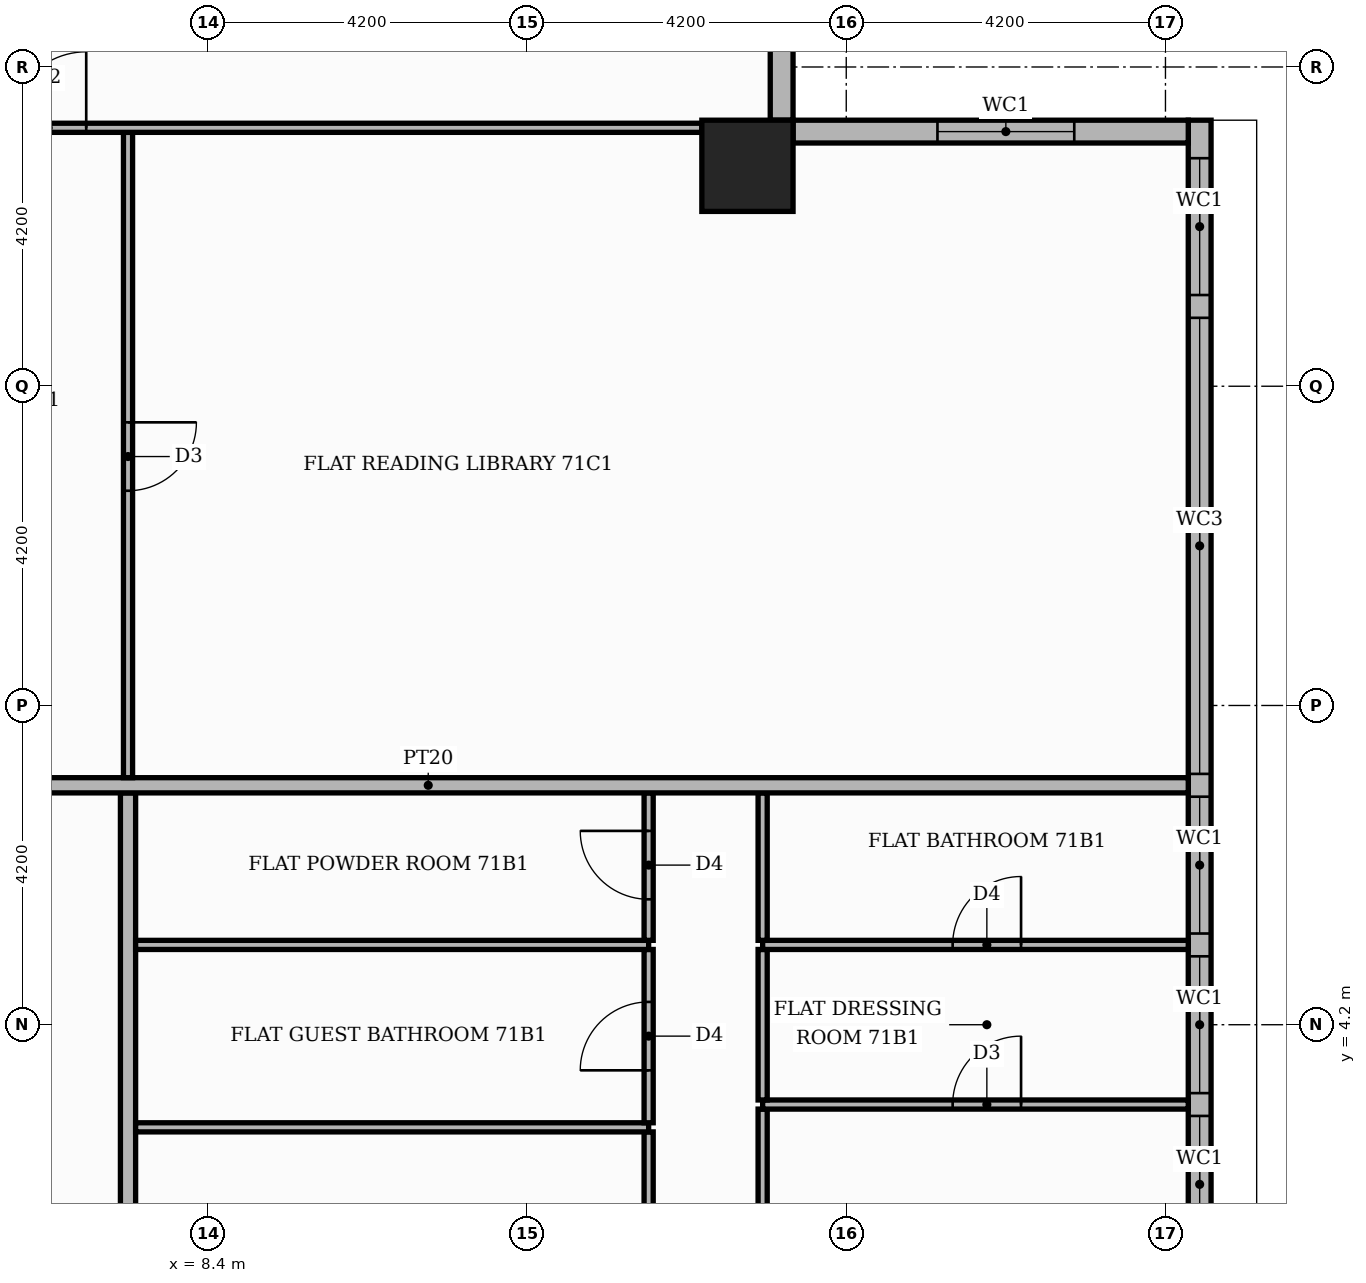
"""IFC4 building model, lengths in metres.
Left out: names, types, materials, properties, quantities, classifications, styles, units other than length and angle.
Written with IfcOpenShell. Run it as: python <this file> out.ifc"""

import sys

from ifc_helpers import new_model, si_unit, direction, frame, frame_2d, origin, origin_2d, place, context, subcontext, project, spatial, rectangle, extrude, element, fill, save


model = new_model("IFC4")
c1 = context("Model", 3, precision=1e-05, world=origin(), true_north=direction((0.0, 1.0)))
c2 = subcontext(c1, "Body", "Model", "MODEL_VIEW")
j1 = project(units=[si_unit("LENGTHUNIT", "METRE"), si_unit("PLANEANGLEUNIT", "RADIAN")], contexts=[c1])
p1 = place(None, origin())
s1 = spatial("IfcSite", under=j1, at=p1, CompositionType="ELEMENT")
p2 = place(p1, origin())
s2 = spatial("IfcBuilding", under=s1, at=p2, CompositionType="ELEMENT")
p3 = place(p2, frame((0.0, 0.0, 296.7)))
s3 = spatial("IfcBuildingStorey", under=s2, at=p3, CompositionType="ELEMENT", Elevation=296.7)
p4 = place(p3, frame((15.5, 15.5, 0.0), z_axis=(0.0, 0.0, 1.0), x_axis=(1.0, 0.0, 0.0)))
e1 = element("IfcColumn", 1, at=p4, inside=s3, PredefinedType="COLUMN", context=c2, shape_type="SweptSolid", body=[
    extrude(rectangle(XDim=1.2, YDim=1.2, at=origin_2d()), origin(), (0.0, 0.0, 1.0), 3.9),
])
p5 = place(p3, frame((21.45, -15.8, 0.0), z_axis=(0.0, 0.0, 1.0), x_axis=(0.0, 1.0, 0.0)))
e2 = element("IfcWall", 2, at=p5, inside=s3, PredefinedType="STANDARD", context=c2, shape_type="SweptSolid", body=[
    extrude(rectangle(XDim=31.9, YDim=0.3, at=frame_2d((15.95, 0.0))), origin(), (0.0, 0.0, 1.0), 3.55),
])
p6 = place(p5, frame((0.2, 0.0, 0.6)))
e3 = element("IfcOpeningElement", 3, at=p6, cuts=e2, PredefinedType="OPENING", context=c2, shape_type="SweptSolid", body=[
    extrude(rectangle(XDim=6.0, YDim=2.4, at=frame_2d((3.0, 1.2))), frame((0.0, 0.16, 0.0), z_axis=(0.0, -1.0, 0.0), x_axis=(1.0, 0.0, 0.0)), (0.0, 0.0, 1.0), 0.32),
])
p7 = place(p5, frame((6.5, 0.0, 0.6)))
e4 = element("IfcOpeningElement", 4, at=p7, cuts=e2, PredefinedType="OPENING", context=c2, shape_type="SweptSolid", body=[
    extrude(rectangle(XDim=3.9, YDim=2.4, at=frame_2d((1.95, 1.2))), frame((0.0, 0.16, 0.0), z_axis=(0.0, -1.0, 0.0), x_axis=(1.0, 0.0, 0.0)), (0.0, 0.0, 1.0), 0.32),
])
p8 = place(p5, frame((10.7, 0.0, 0.6)))
e5 = element("IfcOpeningElement", 5, at=p8, cuts=e2, PredefinedType="OPENING", context=c2, shape_type="SweptSolid", body=[
    extrude(rectangle(XDim=6.0, YDim=2.4, at=frame_2d((3.0, 1.2))), frame((0.0, 0.16, 0.0), z_axis=(0.0, -1.0, 0.0), x_axis=(1.0, 0.0, 0.0)), (0.0, 0.0, 1.0), 0.32),
])
p9 = place(p5, frame((17.0, 0.0, 0.6)))
e6 = element("IfcOpeningElement", 6, at=p9, cuts=e2, PredefinedType="OPENING", context=c2, shape_type="SweptSolid", body=[
    extrude(rectangle(XDim=1.8, YDim=2.4, at=frame_2d((0.9, 1.2))), frame((0.0, 0.16, 0.0), z_axis=(0.0, -1.0, 0.0), x_axis=(1.0, 0.0, 0.0)), (0.0, 0.0, 1.0), 0.32),
])
p10 = place(p5, frame((19.1, 0.0, 0.6)))
e7 = element("IfcOpeningElement", 7, at=p10, cuts=e2, PredefinedType="OPENING", context=c2, shape_type="SweptSolid", body=[
    extrude(rectangle(XDim=1.8, YDim=2.4, at=frame_2d((0.9, 1.2))), frame((0.0, 0.16, 0.0), z_axis=(0.0, -1.0, 0.0), x_axis=(1.0, 0.0, 0.0)), (0.0, 0.0, 1.0), 0.32),
])
p11 = place(p5, frame((21.2, 0.0, 0.6)))
e8 = element("IfcOpeningElement", 8, at=p11, cuts=e2, PredefinedType="OPENING", context=c2, shape_type="SweptSolid", body=[
    extrude(rectangle(XDim=1.8, YDim=2.4, at=frame_2d((0.9, 1.2))), frame((0.0, 0.16, 0.0), z_axis=(0.0, -1.0, 0.0), x_axis=(1.0, 0.0, 0.0)), (0.0, 0.0, 1.0), 0.32),
])
p12 = place(p5, frame((23.3, 0.0, 0.6)))
e9 = element("IfcOpeningElement", 9, at=p12, cuts=e2, PredefinedType="OPENING", context=c2, shape_type="SweptSolid", body=[
    extrude(rectangle(XDim=6.0, YDim=2.4, at=frame_2d((3.0, 1.2))), frame((0.0, 0.16, 0.0), z_axis=(0.0, -1.0, 0.0), x_axis=(1.0, 0.0, 0.0)), (0.0, 0.0, 1.0), 0.32),
])
p13 = place(p5, frame((29.6, 0.0, 0.6)))
e10 = element("IfcOpeningElement", 10, at=p13, cuts=e2, PredefinedType="OPENING", context=c2, shape_type="SweptSolid", body=[
    extrude(rectangle(XDim=1.8, YDim=2.4, at=frame_2d((0.9, 1.2))), frame((0.0, 0.16, 0.0), z_axis=(0.0, -1.0, 0.0), x_axis=(1.0, 0.0, 0.0)), (0.0, 0.0, 1.0), 0.32),
])
p14 = place(p3, frame((21.3, 15.95, 0.0), z_axis=(0.0, 0.0, 1.0), x_axis=(-1.0, 0.0, 0.0)))
e11 = element("IfcWall", 11, at=p14, inside=s3, PredefinedType="STANDARD", context=c2, shape_type="SweptSolid", body=[
    extrude(rectangle(XDim=5.2, YDim=0.3, at=frame_2d((2.6, 0.0))), origin(), (0.0, 0.0, 1.0), 3.55),
])
p15 = place(p14, frame((1.5, 0.0, 0.6)))
e12 = element("IfcOpeningElement", 12, at=p15, cuts=e11, PredefinedType="OPENING", context=c2, shape_type="SweptSolid", body=[
    extrude(rectangle(XDim=1.8, YDim=2.4, at=frame_2d((0.9, 1.2))), frame((0.0, 0.16, 0.0), z_axis=(0.0, -1.0, 0.0), x_axis=(1.0, 0.0, 0.0)), (0.0, 0.0, 1.0), 0.32),
])
p16 = place(p3, frame((15.95, 16.1, 0.0), z_axis=(0.0, 0.0, 1.0), x_axis=(0.0, 1.0, 0.0)))
e13 = element("IfcWall", 13, at=p16, inside=s3, PredefinedType="STANDARD", context=c2, shape_type="SweptSolid", body=[
    extrude(rectangle(XDim=5.5, YDim=0.3, at=frame_2d((2.75, 0.0))), origin(), (0.0, 0.0, 1.0), 3.55),
])
p17 = place(p16, frame((1.9, 0.0, 0.6)))
e14 = element("IfcOpeningElement", 14, at=p17, cuts=e13, PredefinedType="OPENING", context=c2, shape_type="SweptSolid", body=[
    extrude(rectangle(XDim=1.8, YDim=2.4, at=frame_2d((0.9, 1.2))), frame((0.0, 0.16, 0.0), z_axis=(0.0, -1.0, 0.0), x_axis=(1.0, 0.0, 0.0)), (0.0, 0.0, 1.0), 0.32),
])
p18 = place(p3, frame((7.35, -7.25, 0.0), z_axis=(0.0, 0.0, 1.0), x_axis=(0.0, 1.0, 0.0)))
e15 = element("IfcWall", 15, at=p18, inside=s3, PredefinedType="PARTITIONING", context=c2, shape_type="SweptSolid", body=[
    extrude(rectangle(XDim=14.5, YDim=0.2, at=frame_2d((7.25, 0.0))), origin(), (0.0, 0.0, 1.0), 3.55),
])
p19 = place(p18, frame((2.5, 0.0, 0.0)))
e16 = element("IfcOpeningElement", 16, at=p19, cuts=e15, PredefinedType="OPENING", context=c2, shape_type="SweptSolid", body=[
    extrude(rectangle(XDim=1.1, YDim=2.4, at=frame_2d((0.55, 1.2))), frame((0.0, 0.11, 0.0), z_axis=(0.0, -1.0, 0.0), x_axis=(1.0, 0.0, 0.0)), (0.0, 0.0, 1.0), 0.22),
])
p20 = place(p3, frame((15.7, -5.19, 0.0), z_axis=(0.0, 0.0, 1.0), x_axis=(0.0, 1.0, 0.0)))
e17 = element("IfcWall", 17, at=p20, inside=s3, PredefinedType="PARTITIONING", context=c2, shape_type="SweptSolid", body=[
    extrude(rectangle(XDim=8.28, YDim=0.12, at=frame_2d((4.14, 0.0))), origin(), (0.0, 0.0, 1.0), 3.55),
])
p21 = place(p20, frame((3.69, 0.0, 0.0)))
e18 = element("IfcOpeningElement", 18, at=p21, cuts=e17, PredefinedType="OPENING", context=c2, shape_type="SweptSolid", body=[
    extrude(rectangle(XDim=0.9, YDim=2.1, at=frame_2d((0.45, 1.05))), frame((0.0, 0.07, 0.0), z_axis=(0.0, -1.0, 0.0), x_axis=(1.0, 0.0, 0.0)), (0.0, 0.0, 1.0), 0.14),
])
p22 = place(p3, frame((14.2, -0.99, 0.0), z_axis=(0.0, 0.0, 1.0), x_axis=(0.0, 1.0, 0.0)))
e19 = element("IfcWall", 19, at=p22, inside=s3, PredefinedType="PARTITIONING", context=c2, shape_type="SweptSolid", body=[
    extrude(rectangle(XDim=3.78, YDim=0.12, at=frame_2d((1.89, 0.0))), origin(), (0.0, 0.0, 1.0), 3.55),
])
p23 = place(p3, frame((7.45, 2.85, 0.0), z_axis=(0.0, 0.0, 1.0), x_axis=(1.0, 0.0, 0.0)))
e20 = element("IfcWall", 20, at=p23, inside=s3, PredefinedType="PARTITIONING", context=c2, shape_type="SweptSolid", body=[
    extrude(rectangle(XDim=6.75, YDim=0.12, at=frame_2d((3.375, 0.0))), origin(), (0.0, 0.0, 1.0), 3.55),
])
p24 = place(p3, frame((14.2, 2.91, 0.0), z_axis=(0.0, 0.0, 1.0), x_axis=(0.0, 1.0, 0.0)))
e21 = element("IfcWall", 21, at=p24, inside=s3, PredefinedType="PARTITIONING", context=c2, shape_type="SweptSolid", body=[
    extrude(rectangle(XDim=2.28, YDim=0.12, at=frame_2d((1.14, 0.0))), origin(), (0.0, 0.0, 1.0), 3.55),
])
p25 = place(p24, frame((0.69, 0.0, 0.0)))
e22 = element("IfcOpeningElement", 22, at=p25, cuts=e21, PredefinedType="OPENING", context=c2, shape_type="SweptSolid", body=[
    extrude(rectangle(XDim=0.9, YDim=2.1, at=frame_2d((0.45, 1.05))), frame((0.0, 0.07, 0.0), z_axis=(0.0, -1.0, 0.0), x_axis=(1.0, 0.0, 0.0)), (0.0, 0.0, 1.0), 0.14),
])
p26 = place(p3, frame((15.7, 3.15, 0.0), z_axis=(0.0, 0.0, 1.0), x_axis=(1.0, 0.0, 0.0)))
e23 = element("IfcWall", 23, at=p26, inside=s3, PredefinedType="PARTITIONING", context=c2, shape_type="SweptSolid", body=[
    extrude(rectangle(XDim=5.6, YDim=0.12, at=frame_2d((2.8, 0.0))), origin(), (0.0, 0.0, 1.0), 3.55),
])
p27 = place(p26, frame((2.5, 0.0, 0.0)))
e24 = element("IfcOpeningElement", 24, at=p27, cuts=e23, PredefinedType="OPENING", context=c2, shape_type="SweptSolid", body=[
    extrude(rectangle(XDim=0.9, YDim=2.1, at=frame_2d((0.45, 1.05))), frame((0.0, 0.07, 0.0), z_axis=(0.0, -1.0, 0.0), x_axis=(1.0, 0.0, 0.0)), (0.0, 0.0, 1.0), 0.14),
])
p28 = place(p3, frame((15.7, 3.21, 0.0), z_axis=(0.0, 0.0, 1.0), x_axis=(0.0, 1.0, 0.0)))
e25 = element("IfcWall", 25, at=p28, inside=s3, PredefinedType="PARTITIONING", context=c2, shape_type="SweptSolid", body=[
    extrude(rectangle(XDim=1.98, YDim=0.12, at=frame_2d((0.99, 0.0))), origin(), (0.0, 0.0, 1.0), 3.55),
])
p29 = place(p3, frame((7.45, 5.25, 0.0), z_axis=(0.0, 0.0, 1.0), x_axis=(1.0, 0.0, 0.0)))
e26 = element("IfcWall", 26, at=p29, inside=s3, PredefinedType="PARTITIONING", context=c2, shape_type="SweptSolid", body=[
    extrude(rectangle(XDim=6.75, YDim=0.12, at=frame_2d((3.375, 0.0))), origin(), (0.0, 0.0, 1.0), 3.55),
])
p30 = place(p3, frame((15.7, 5.25, 0.0), z_axis=(0.0, 0.0, 1.0), x_axis=(1.0, 0.0, 0.0)))
e27 = element("IfcWall", 27, at=p30, inside=s3, PredefinedType="PARTITIONING", context=c2, shape_type="SweptSolid", body=[
    extrude(rectangle(XDim=5.6, YDim=0.12, at=frame_2d((2.8, 0.0))), origin(), (0.0, 0.0, 1.0), 3.55),
])
p31 = place(p30, frame((2.5, 0.0, 0.0)))
e28 = element("IfcOpeningElement", 28, at=p31, cuts=e27, PredefinedType="OPENING", context=c2, shape_type="SweptSolid", body=[
    extrude(rectangle(XDim=0.9, YDim=2.1, at=frame_2d((0.45, 1.05))), frame((0.0, 0.07, 0.0), z_axis=(0.0, -1.0, 0.0), x_axis=(1.0, 0.0, 0.0)), (0.0, 0.0, 1.0), 0.14),
])
p32 = place(p3, frame((14.2, 5.31, 0.0), z_axis=(0.0, 0.0, 1.0), x_axis=(0.0, 1.0, 0.0)))
e29 = element("IfcWall", 29, at=p32, inside=s3, PredefinedType="PARTITIONING", context=c2, shape_type="SweptSolid", body=[
    extrude(rectangle(XDim=1.94, YDim=0.12, at=frame_2d((0.97, 0.0))), origin(), (0.0, 0.0, 1.0), 3.55),
])
p33 = place(p32, frame((0.54, 0.0, 0.0)))
e30 = element("IfcOpeningElement", 30, at=p33, cuts=e29, PredefinedType="OPENING", context=c2, shape_type="SweptSolid", body=[
    extrude(rectangle(XDim=0.9, YDim=2.1, at=frame_2d((0.45, 1.05))), frame((0.0, 0.07, 0.0), z_axis=(0.0, -1.0, 0.0), x_axis=(1.0, 0.0, 0.0)), (0.0, 0.0, 1.0), 0.14),
])
p34 = place(p3, frame((15.7, 5.31, 0.0), z_axis=(0.0, 0.0, 1.0), x_axis=(0.0, 1.0, 0.0)))
e31 = element("IfcWall", 31, at=p34, inside=s3, PredefinedType="PARTITIONING", context=c2, shape_type="SweptSolid", body=[
    extrude(rectangle(XDim=1.94, YDim=0.12, at=frame_2d((0.97, 0.0))), origin(), (0.0, 0.0, 1.0), 3.55),
])
p35 = place(p3, frame((1.3, 7.35, 0.0), z_axis=(0.0, 0.0, 1.0), x_axis=(1.0, 0.0, 0.0)))
e32 = element("IfcWall", 32, at=p35, inside=s3, PredefinedType="PARTITIONING", context=c2, shape_type="SweptSolid", body=[
    extrude(rectangle(XDim=20.0, YDim=0.2, at=frame_2d((10.0, 0.0))), origin(), (0.0, 0.0, 1.0), 3.55),
])
p36 = place(p35, frame((2.475, 0.0, 0.0)))
e33 = element("IfcOpeningElement", 33, at=p36, cuts=e32, PredefinedType="OPENING", context=c2, shape_type="SweptSolid", body=[
    extrude(rectangle(XDim=1.1, YDim=2.4, at=frame_2d((0.55, 1.2))), frame((0.0, 0.11, 0.0), z_axis=(0.0, -1.0, 0.0), x_axis=(1.0, 0.0, 0.0)), (0.0, 0.0, 1.0), 0.22),
])
p37 = place(p3, frame((7.35, 7.45, 0.0), z_axis=(0.0, 0.0, 1.0), x_axis=(0.0, 1.0, 0.0)))
e34 = element("IfcWall", 34, at=p37, inside=s3, PredefinedType="PARTITIONING", context=c2, shape_type="SweptSolid", body=[
    extrude(rectangle(XDim=8.49, YDim=0.12, at=frame_2d((4.245, 0.0))), origin(), (0.0, 0.0, 1.0), 3.55),
])
p38 = place(p37, frame((3.775, 0.0, 0.0)))
e35 = element("IfcOpeningElement", 35, at=p38, cuts=e34, PredefinedType="OPENING", context=c2, shape_type="SweptSolid", body=[
    extrude(rectangle(XDim=0.9, YDim=2.1, at=frame_2d((0.45, 1.05))), frame((0.0, 0.07, 0.0), z_axis=(0.0, -1.0, 0.0), x_axis=(1.0, 0.0, 0.0)), (0.0, 0.0, 1.0), 0.14),
])
p39 = place(p3, frame((-7.25, 16.0, 0.0), z_axis=(0.0, 0.0, 1.0), x_axis=(1.0, 0.0, 0.0)))
e36 = element("IfcWall", 36, at=p39, inside=s3, PredefinedType="PARTITIONING", context=c2, shape_type="SweptSolid", body=[
    extrude(rectangle(XDim=22.15, YDim=0.12, at=frame_2d((11.075, 0.0))), origin(), (0.0, 0.0, 1.0), 3.55),
])
p40 = place(p39, frame((13.05, 0.0, 0.0)))
e37 = element("IfcOpeningElement", 37, at=p40, cuts=e36, PredefinedType="OPENING", context=c2, shape_type="SweptSolid", body=[
    extrude(rectangle(XDim=1.0, YDim=2.1, at=frame_2d((0.5, 1.05))), frame((0.0, 0.07, 0.0), z_axis=(0.0, -1.0, 0.0), x_axis=(1.0, 0.0, 0.0)), (0.0, 0.0, 1.0), 0.14),
])
p41 = place(p39, frame((7.85, 0.0, 0.0)))
e38 = element("IfcOpeningElement", 38, at=p41, cuts=e36, PredefinedType="OPENING", context=c2, shape_type="SweptSolid", body=[
    extrude(rectangle(XDim=0.9, YDim=2.1, at=frame_2d((0.45, 1.05))), frame((0.0, 0.07, 0.0), z_axis=(0.0, -1.0, 0.0), x_axis=(1.0, 0.0, 0.0)), (0.0, 0.0, 1.0), 0.14),
])
p42 = place(p9, origin())
e39 = element("IfcWindow", 39, at=p42, inside=s3, PartitioningType="SINGLE_PANEL", PredefinedType="WINDOW", context=c2, shape_type="SweptSolid", body=[
    extrude(rectangle(XDim=1.8, YDim=2.4, at=frame_2d((0.9, 1.2))), frame((0.0, 0.03, 0.0), z_axis=(0.0, -1.0, 0.0), x_axis=(1.0, 0.0, 0.0)), (0.0, 0.0, 1.0), 0.06),
])
fill(e6, e39)
p43 = place(p10, origin())
e40 = element("IfcWindow", 40, at=p43, inside=s3, PartitioningType="SINGLE_PANEL", PredefinedType="WINDOW", context=c2, shape_type="SweptSolid", body=[
    extrude(rectangle(XDim=1.8, YDim=2.4, at=frame_2d((0.9, 1.2))), frame((0.0, 0.03, 0.0), z_axis=(0.0, -1.0, 0.0), x_axis=(1.0, 0.0, 0.0)), (0.0, 0.0, 1.0), 0.06),
])
fill(e7, e40)
p44 = place(p11, origin())
e41 = element("IfcWindow", 41, at=p44, inside=s3, PartitioningType="SINGLE_PANEL", PredefinedType="WINDOW", context=c2, shape_type="SweptSolid", body=[
    extrude(rectangle(XDim=1.8, YDim=2.4, at=frame_2d((0.9, 1.2))), frame((0.0, 0.03, 0.0), z_axis=(0.0, -1.0, 0.0), x_axis=(1.0, 0.0, 0.0)), (0.0, 0.0, 1.0), 0.06),
])
fill(e8, e41)
p45 = place(p12, origin())
e42 = element("IfcWindow", 42, at=p45, inside=s3, PartitioningType="SINGLE_PANEL", PredefinedType="WINDOW", context=c2, shape_type="SweptSolid", body=[
    extrude(rectangle(XDim=6.0, YDim=2.4, at=frame_2d((3.0, 1.2))), frame((0.0, 0.03, 0.0), z_axis=(0.0, -1.0, 0.0), x_axis=(1.0, 0.0, 0.0)), (0.0, 0.0, 1.0), 0.06),
])
fill(e9, e42)
p46 = place(p13, origin())
e43 = element("IfcWindow", 43, at=p46, inside=s3, PartitioningType="SINGLE_PANEL", PredefinedType="WINDOW", context=c2, shape_type="SweptSolid", body=[
    extrude(rectangle(XDim=1.8, YDim=2.4, at=frame_2d((0.9, 1.2))), frame((0.0, 0.03, 0.0), z_axis=(0.0, -1.0, 0.0), x_axis=(1.0, 0.0, 0.0)), (0.0, 0.0, 1.0), 0.06),
])
fill(e10, e43)
p47 = place(p15, origin())
e44 = element("IfcWindow", 44, at=p47, inside=s3, PartitioningType="SINGLE_PANEL", PredefinedType="WINDOW", context=c2, shape_type="SweptSolid", body=[
    extrude(rectangle(XDim=1.8, YDim=2.4, at=frame_2d((0.9, 1.2))), frame((0.0, 0.03, 0.0), z_axis=(0.0, -1.0, 0.0), x_axis=(1.0, 0.0, 0.0)), (0.0, 0.0, 1.0), 0.06),
])
fill(e12, e44)
p48 = place(p25, origin())
e45 = element("IfcDoor", 45, at=p48, inside=s3, OperationType="SINGLE_SWING_LEFT", PredefinedType="DOOR", context=c2, shape_type="SweptSolid", body=[
    extrude(rectangle(XDim=0.9, YDim=2.1, at=frame_2d((0.45, 1.05))), frame((0.0, 0.025, 0.0), z_axis=(0.0, -1.0, 0.0), x_axis=(1.0, 0.0, 0.0)), (0.0, 0.0, 1.0), 0.05),
])
fill(e22, e45)
p49 = place(p33, origin())
e46 = element("IfcDoor", 46, at=p49, inside=s3, OperationType="SINGLE_SWING_RIGHT", PredefinedType="DOOR", context=c2, shape_type="SweptSolid", body=[
    extrude(rectangle(XDim=0.9, YDim=2.1, at=frame_2d((0.45, 1.05))), frame((0.0, 0.025, 0.0), z_axis=(0.0, -1.0, 0.0), x_axis=(1.0, 0.0, 0.0)), (0.0, 0.0, 1.0), 0.05),
])
fill(e30, e46)
p50 = place(p27, origin())
e47 = element("IfcDoor", 47, at=p50, inside=s3, OperationType="SINGLE_SWING_RIGHT", PredefinedType="DOOR", context=c2, shape_type="SweptSolid", body=[
    extrude(rectangle(XDim=0.9, YDim=2.1, at=frame_2d((0.45, 1.05))), frame((0.0, 0.025, 0.0), z_axis=(0.0, -1.0, 0.0), x_axis=(1.0, 0.0, 0.0)), (0.0, 0.0, 1.0), 0.05),
])
fill(e24, e47)
p51 = place(p31, origin())
e48 = element("IfcDoor", 48, at=p51, inside=s3, OperationType="SINGLE_SWING_RIGHT", PredefinedType="DOOR", context=c2, shape_type="SweptSolid", body=[
    extrude(rectangle(XDim=0.9, YDim=2.1, at=frame_2d((0.45, 1.05))), frame((0.0, 0.025, 0.0), z_axis=(0.0, -1.0, 0.0), x_axis=(1.0, 0.0, 0.0)), (0.0, 0.0, 1.0), 0.05),
])
fill(e28, e48)
p52 = place(p38, frame((0.9, 0.0, 0.0), z_axis=(0.0, 0.0, 1.0), x_axis=(-1.0, 0.0, 0.0)))
e49 = element("IfcDoor", 49, at=p52, inside=s3, OperationType="SINGLE_SWING_RIGHT", PredefinedType="DOOR", context=c2, shape_type="SweptSolid", body=[
    extrude(rectangle(XDim=0.9, YDim=2.1, at=frame_2d((0.45, 1.05))), frame((0.0, 0.025, 0.0), z_axis=(0.0, -1.0, 0.0), x_axis=(1.0, 0.0, 0.0)), (0.0, 0.0, 1.0), 0.05),
])
fill(e35, e49)
p53 = place(p40, origin())
e50 = element("IfcDoor", 50, at=p53, inside=s3, OperationType="SINGLE_SWING_RIGHT", PredefinedType="DOOR", context=c2, shape_type="SweptSolid", body=[
    extrude(rectangle(XDim=1.0, YDim=2.1, at=frame_2d((0.5, 1.05))), frame((0.0, 0.025, 0.0), z_axis=(0.0, -1.0, 0.0), x_axis=(1.0, 0.0, 0.0)), (0.0, 0.0, 1.0), 0.05),
])
fill(e37, e50)
save(model, sys.argv[1])
